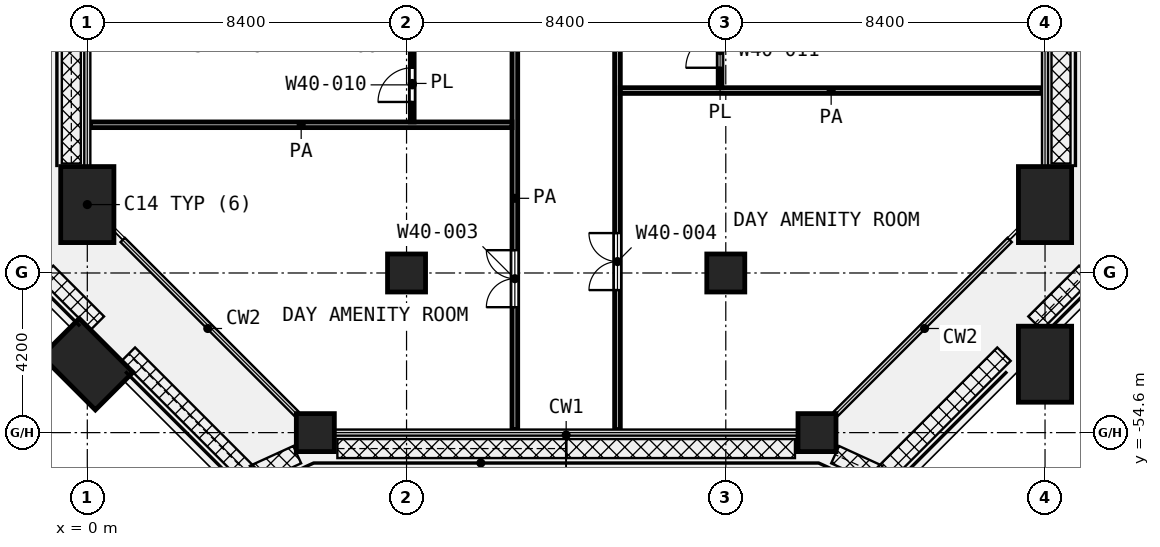
"""IFC4 building model, lengths in metres.
Left out: names, types, materials, properties, quantities, classifications, styles, units other than length and angle.
Written with IfcOpenShell. Run it as: python <this file> out.ifc"""

import sys

from ifc_helpers import new_model, si_unit, direction, frame, frame_2d, origin, origin_2d, place, context, subcontext, project, spatial, rectangle, extrude, element, fill, save


model = new_model("IFC4")
c1 = context("Model", 3, precision=1e-05, world=origin(), true_north=direction((0.0, 1.0)))
c2 = subcontext(c1, "Body", "Model", "MODEL_VIEW")
j1 = project(units=[si_unit("LENGTHUNIT", "METRE"), si_unit("PLANEANGLEUNIT", "RADIAN")], contexts=[c1])
p1 = place(None, origin())
s1 = spatial("IfcSite", under=j1, at=p1, CompositionType="ELEMENT")
p2 = place(p1, origin())
s2 = spatial("IfcBuilding", under=s1, at=p2, CompositionType="ELEMENT")
p3 = place(p2, frame((0.0, 0.0, 175.2)))
s3 = spatial("IfcBuildingStorey", under=s2, at=p3, CompositionType="ELEMENT", Elevation=175.2)
for number, where, z_axis, x_axis in (
    (1, (0.0, -48.6, 0.0), (0.0, 0.0, 1.0), (0.0, 1.0, 0.0)),
    (2, (25.2, -48.6, 0.0), (0.0, 0.0, 1.0), (0.0, -1.0, 0.0)),
):
    element("IfcColumn", number, at=place(p3, frame(where, z_axis=z_axis, x_axis=x_axis)), inside=s3, PredefinedType="COLUMN", context=c2, shape_type="SweptSolid", body=[
        extrude(rectangle(XDim=2.0, YDim=1.4, at=origin_2d()), origin(), (0.0, 0.0, 1.0), 4.2),
    ])
for number, where, z_axis, x_axis in (
    (3, (8.4, -50.4, 0.0), (0.0, 0.0, 1.0), (1.0, 0.0, 0.0)),
    (4, (16.8, -50.4, 0.0), (0.0, 0.0, 1.0), (1.0, 0.0, 0.0)),
    (5, (6.0, -54.6, 0.0), (0.0, 0.0, 1.0), (1.0, 0.0, 0.0)),
    (6, (19.2, -54.6, 0.0), (0.0, 0.0, 1.0), (1.0, 0.0, 0.0)),
):
    element("IfcColumn", number, at=place(p3, frame(where, z_axis=z_axis, x_axis=x_axis)), inside=s3, PredefinedType="COLUMN", context=c2, shape_type="SweptSolid", body=[
        extrude(rectangle(XDim=1.0, YDim=1.0, at=origin_2d()), origin(), (0.0, 0.0, 1.0), 4.2),
    ])
for number, where, z_axis, x_axis in (
    (7, (25.2, -52.8, 0.0), (0.0, 0.0, 1.0), (0.0, -1.0, 0.0)),
    (8, (0.0, -52.8, 0.0), (0.0, 0.0, 1.0), (-0.707, 0.707, 0.0)),
):
    element("IfcColumn", number, at=place(p3, frame(where, z_axis=z_axis, x_axis=x_axis)), inside=s3, PredefinedType="COLUMN", context=c2, shape_type="SweptSolid", body=[
        extrude(rectangle(XDim=2.0, YDim=1.4, at=origin_2d()), origin(), (0.0, 0.0, 1.0), 4.2),
    ])
p4 = place(p3, frame((8.55, -46.425, 0.0), z_axis=(0.0, 0.0, 1.0), x_axis=(0.0, 1.0, 0.0)))
e9 = element("IfcWall", 9, at=p4, inside=s3, PredefinedType="PARTITIONING", context=c2, shape_type="SweptSolid", body=[
    extrude(rectangle(XDim=2.025, YDim=0.1, at=frame_2d((1.013, 0.0))), origin(), (0.0, 0.0, 1.0), 3.6),
])
p5 = place(p4, frame((0.525, 0.0, 0.0)))
e10 = element("IfcOpeningElement", 10, at=p5, cuts=e9, PredefinedType="OPENING", context=c2, shape_type="SweptSolid", body=[
    extrude(rectangle(XDim=0.9, YDim=2.1, at=frame_2d((0.45, 1.05))), frame((0.0, 0.06, 0.0), z_axis=(0.0, -1.0, 0.0), x_axis=(1.0, 0.0, 0.0)), (0.0, 0.0, 1.0), 0.12),
])
p6 = place(p3, frame((16.65, -45.525, 0.0), z_axis=(0.0, 0.0, 1.0), x_axis=(0.0, 1.0, 0.0)))
e11 = element("IfcWall", 11, at=p6, inside=s3, PredefinedType="PARTITIONING", context=c2, shape_type="SweptSolid", body=[
    extrude(rectangle(XDim=2.025, YDim=0.1, at=frame_2d((1.012, 0.0))), origin(), (0.0, 0.0, 1.0), 3.6),
])
p7 = place(p6, frame((0.525, 0.0, 0.0)))
e12 = element("IfcOpeningElement", 12, at=p7, cuts=e11, PredefinedType="OPENING", context=c2, shape_type="SweptSolid", body=[
    extrude(rectangle(XDim=0.9, YDim=2.1, at=frame_2d((0.45, 1.05))), frame((0.0, 0.06, 0.0), z_axis=(0.0, -1.0, 0.0), x_axis=(1.0, 0.0, 0.0)), (0.0, 0.0, 1.0), 0.12),
])
p8 = place(p3, frame((0.08, -46.5, 0.0), z_axis=(0.0, 0.0, 1.0), x_axis=(1.0, 0.0, 0.0)))
e13 = element("IfcWall", 13, at=p8, inside=s3, PredefinedType="PARTITIONING", context=c2, shape_type="SweptSolid", body=[
    extrude(rectangle(XDim=11.095, YDim=0.15, at=frame_2d((5.547, 0.0))), origin(), (0.0, 0.0, 1.0), 3.6),
])
p9 = place(p3, frame((14.025, -45.6, 0.0), z_axis=(0.0, 0.0, 1.0), x_axis=(1.0, 0.0, 0.0)))
e14 = element("IfcWall", 14, at=p9, inside=s3, PredefinedType="PARTITIONING", context=c2, shape_type="SweptSolid", body=[
    extrude(rectangle(XDim=11.095, YDim=0.15, at=frame_2d((5.548, 0.0))), origin(), (0.0, 0.0, 1.0), 3.6),
])
p10 = place(p3, frame((11.25, -54.52, 0.0), z_axis=(0.0, 0.0, 1.0), x_axis=(0.0, 1.0, 0.0)))
e15 = element("IfcWall", 15, at=p10, inside=s3, PredefinedType="PARTITIONING", context=c2, shape_type="SweptSolid", body=[
    extrude(rectangle(XDim=12.17, YDim=0.15, at=frame_2d((6.085, 0.0))), origin(), (0.0, 0.0, 1.0), 3.6),
])
p11 = place(p10, frame((3.22, 0.0, 0.0)))
e16 = element("IfcOpeningElement", 16, at=p11, cuts=e15, PredefinedType="OPENING", context=c2, shape_type="SweptSolid", body=[
    extrude(rectangle(XDim=1.5, YDim=2.1, at=frame_2d((0.75, 1.05))), frame((0.0, 0.085, 0.0), z_axis=(0.0, -1.0, 0.0), x_axis=(1.0, 0.0, 0.0)), (0.0, 0.0, 1.0), 0.17),
])
p12 = place(p3, frame((13.95, -54.52, 0.0), z_axis=(0.0, 0.0, 1.0), x_axis=(0.0, 1.0, 0.0)))
e17 = element("IfcWall", 17, at=p12, inside=s3, PredefinedType="PARTITIONING", context=c2, shape_type="SweptSolid", body=[
    extrude(rectangle(XDim=25.12, YDim=0.15, at=frame_2d((12.56, 0.0))), origin(), (0.0, 0.0, 1.0), 3.6),
])
p13 = place(p12, frame((20.17, 0.0, 0.0)))
e18 = element("IfcOpeningElement", 18, at=p13, cuts=e17, PredefinedType="OPENING", context=c2, shape_type="SweptSolid", body=[
    extrude(rectangle(XDim=1.2, YDim=2.1, at=frame_2d((0.6, 1.05))), frame((0.0, 0.085, 0.0), z_axis=(0.0, -1.0, 0.0), x_axis=(1.0, 0.0, 0.0)), (0.0, 0.0, 1.0), 0.17),
])
p14 = place(p12, frame((13.97, 0.0, 0.0)))
e19 = element("IfcOpeningElement", 19, at=p14, cuts=e17, PredefinedType="OPENING", context=c2, shape_type="SweptSolid", body=[
    extrude(rectangle(XDim=1.0, YDim=2.1, at=frame_2d((0.5, 1.05))), frame((0.0, 0.085, 0.0), z_axis=(0.0, -1.0, 0.0), x_axis=(1.0, 0.0, 0.0)), (0.0, 0.0, 1.0), 0.17),
])
p15 = place(p12, frame((11.22, 0.0, 0.0)))
e20 = element("IfcOpeningElement", 20, at=p15, cuts=e17, PredefinedType="OPENING", context=c2, shape_type="SweptSolid", body=[
    extrude(rectangle(XDim=1.1, YDim=2.1, at=frame_2d((0.55, 1.05))), frame((0.0, 0.085, 0.0), z_axis=(0.0, -1.0, 0.0), x_axis=(1.0, 0.0, 0.0)), (0.0, 0.0, 1.0), 0.17),
])
p16 = place(p12, frame((3.67, 0.0, 0.0)))
e21 = element("IfcOpeningElement", 21, at=p16, cuts=e17, PredefinedType="OPENING", context=c2, shape_type="SweptSolid", body=[
    extrude(rectangle(XDim=1.5, YDim=2.1, at=frame_2d((0.75, 1.05))), frame((0.0, 0.085, 0.0), z_axis=(0.0, -1.0, 0.0), x_axis=(1.0, 0.0, 0.0)), (0.0, 0.0, 1.0), 0.17),
])
p17 = place(p5, origin())
e22 = element("IfcDoor", 22, at=p17, inside=s3, OperationType="SINGLE_SWING_LEFT", PredefinedType="DOOR", context=c2, shape_type="SweptSolid", body=[
    extrude(rectangle(XDim=0.9, YDim=2.1, at=frame_2d((0.45, 1.05))), frame((0.0, 0.025, 0.0), z_axis=(0.0, -1.0, 0.0), x_axis=(1.0, 0.0, 0.0)), (0.0, 0.0, 1.0), 0.05),
])
fill(e10, e22)
p18 = place(p11, origin())
e23 = element("IfcDoor", 23, at=p18, inside=s3, OperationType="DOUBLE_DOOR_SINGLE_SWING", PredefinedType="DOOR", context=c2, shape_type="SweptSolid", body=[
    extrude(rectangle(XDim=1.5, YDim=2.1, at=frame_2d((0.75, 1.05))), frame((0.0, 0.025, 0.0), z_axis=(0.0, -1.0, 0.0), x_axis=(1.0, 0.0, 0.0)), (0.0, 0.0, 1.0), 0.05),
])
fill(e16, e23)
p19 = place(p7, origin())
e24 = element("IfcDoor", 24, at=p19, inside=s3, OperationType="SINGLE_SWING_LEFT", PredefinedType="DOOR", context=c2, shape_type="SweptSolid", body=[
    extrude(rectangle(XDim=0.9, YDim=2.1, at=frame_2d((0.45, 1.05))), frame((0.0, 0.025, 0.0), z_axis=(0.0, -1.0, 0.0), x_axis=(1.0, 0.0, 0.0)), (0.0, 0.0, 1.0), 0.05),
])
fill(e12, e24)
p20 = place(p16, origin())
e25 = element("IfcDoor", 25, at=p20, inside=s3, OperationType="DOUBLE_DOOR_SINGLE_SWING", PredefinedType="DOOR", context=c2, shape_type="SweptSolid", body=[
    extrude(rectangle(XDim=1.5, YDim=2.1, at=frame_2d((0.75, 1.05))), frame((0.0, 0.025, 0.0), z_axis=(0.0, -1.0, 0.0), x_axis=(1.0, 0.0, 0.0)), (0.0, 0.0, 1.0), 0.05),
])
fill(e21, e25)
save(model, sys.argv[1])
